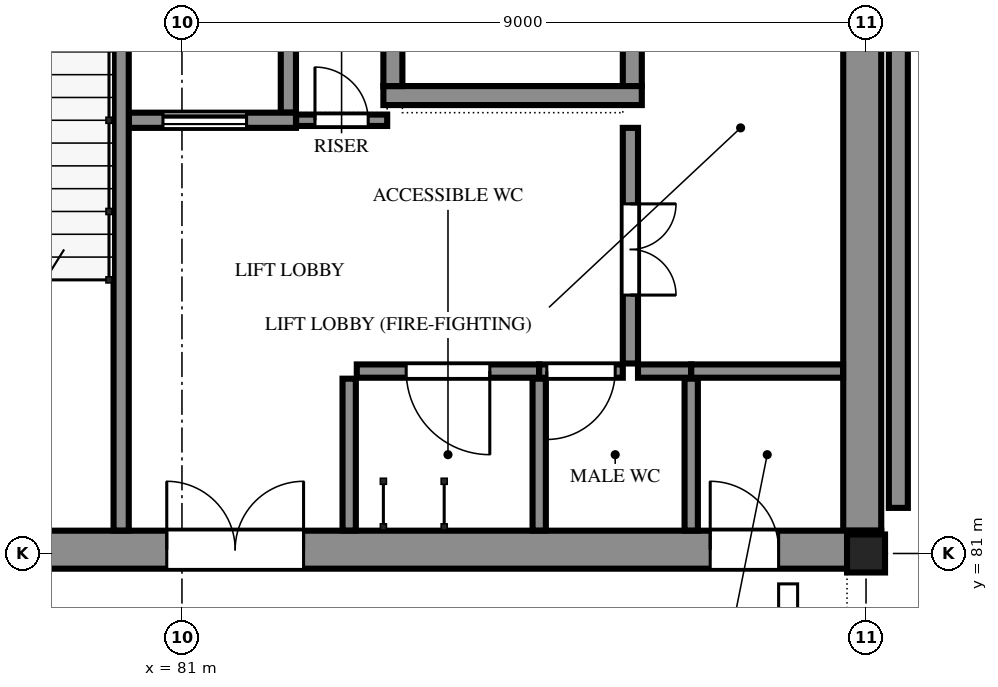
"""IFC4 building model, lengths in metres.
Left out: names, types, materials, properties, quantities, classifications, styles, units other than length and angle.
Written with IfcOpenShell. Run it as: python <this file> out.ifc"""

import sys

from ifc_helpers import new_model, si_unit, direction, frame, frame_2d, origin, origin_2d, place, context, subcontext, project, spatial, polyline, rectangle, hollow_rectangle, outline, extrude, element, fill, save


model = new_model("IFC4")
c1 = context("Model", 3, precision=1e-05, world=origin(), true_north=direction((0.0, 1.0)))
c2 = subcontext(c1, "Body", "Model", "MODEL_VIEW")
j1 = project(units=[si_unit("LENGTHUNIT", "METRE"), si_unit("PLANEANGLEUNIT", "RADIAN")], contexts=[c1])
p1 = place(None, origin())
s1 = spatial("IfcSite", under=j1, at=p1, CompositionType="ELEMENT")
p2 = place(p1, origin())
s2 = spatial("IfcBuilding", under=s1, at=p2, CompositionType="ELEMENT")
p3 = place(p2, frame((0.0, 0.0, 11.7)))
s3 = spatial("IfcBuildingStorey", under=s2, at=p3, CompositionType="ELEMENT", Elevation=11.7)
p4 = place(p3, frame((90.0, 81.0, 0.0), z_axis=(0.0, 0.0, 1.0), x_axis=(1.0, 0.0, 0.0)))
e1 = element("IfcColumn", 1, at=p4, inside=s3, PredefinedType="COLUMN", context=c2, shape_type="SweptSolid", body=[
    extrude(hollow_rectangle(XDim=0.5, YDim=0.5, WallThickness=0.032, at=origin_2d()), origin(), (0.0, 0.0, 1.0), 4.2),
])
p5 = place(p3, frame((71.8, 81.05, 0.0), z_axis=(0.0, 0.0, 1.0), x_axis=(1.0, 0.0, 0.0)))
e2 = element("IfcWall", 2, at=p5, inside=s3, PredefinedType="SOLIDWALL", context=c2, shape_type="SweptSolid", body=[
    extrude(rectangle(XDim=18.4, YDim=0.5, at=frame_2d((9.2, 0.0))), origin(), (0.0, 0.0, 1.0), 4.2),
])
p6 = place(p5, frame((1.5, 0.0, 0.0)))
e3 = element("IfcOpeningElement", 3, at=p6, cuts=e2, PredefinedType="OPENING", context=c2, shape_type="SweptSolid", body=[
    extrude(rectangle(XDim=1.8, YDim=2.1, at=frame_2d((0.9, 1.05))), frame((0.0, 0.26, 0.0), z_axis=(0.0, -1.0, 0.0), x_axis=(1.0, 0.0, 0.0)), (0.0, 0.0, 1.0), 0.52),
])
p7 = place(p5, frame((5.5, 0.0, 0.0)))
e4 = element("IfcOpeningElement", 4, at=p7, cuts=e2, PredefinedType="OPENING", context=c2, shape_type="SweptSolid", body=[
    extrude(rectangle(XDim=1.8, YDim=2.1, at=frame_2d((0.9, 1.05))), frame((0.0, 0.26, 0.0), z_axis=(0.0, -1.0, 0.0), x_axis=(1.0, 0.0, 0.0)), (0.0, 0.0, 1.0), 0.52),
])
p8 = place(p5, frame((9.0, 0.0, 0.0)))
e5 = element("IfcOpeningElement", 5, at=p8, cuts=e2, PredefinedType="OPENING", context=c2, shape_type="SweptSolid", body=[
    extrude(rectangle(XDim=1.8, YDim=2.1, at=frame_2d((0.9, 1.05))), frame((0.0, 0.26, 0.0), z_axis=(0.0, -1.0, 0.0), x_axis=(1.0, 0.0, 0.0)), (0.0, 0.0, 1.0), 0.52),
])
p9 = place(p5, frame((16.15, 0.0, 0.0)))
e6 = element("IfcOpeningElement", 6, at=p9, cuts=e2, PredefinedType="OPENING", context=c2, shape_type="SweptSolid", body=[
    extrude(rectangle(XDim=0.9, YDim=2.1, at=frame_2d((0.45, 1.05))), frame((0.0, 0.26, 0.0), z_axis=(0.0, -1.0, 0.0), x_axis=(1.0, 0.0, 0.0)), (0.0, 0.0, 1.0), 0.52),
])
p10 = place(p3, frame((89.95, 81.3, 0.0), z_axis=(0.0, 0.0, 1.0), x_axis=(0.0, 1.0, 0.0)))
e7 = element("IfcWall", 7, at=p10, inside=s3, PredefinedType="SOLIDWALL", context=c2, shape_type="SweptSolid", body=[
    extrude(rectangle(XDim=8.4, YDim=0.5, at=frame_2d((4.2, 0.0))), origin(), (0.0, 0.0, 1.0), 4.2),
])
p11 = place(p3, frame((90.425, 81.6, 0.0), z_axis=(0.0, 0.0, 1.0), x_axis=(0.0, 1.0, 0.0)))
e8 = element("IfcWall", 8, at=p11, inside=s3, PredefinedType="SOLIDWALL", context=c2, shape_type="SweptSolid", body=[
    extrude(outline(polyline([(0.0, 0.0), (8.7, 0.0), (8.7, 12.6), (0.0, 12.6), (0.0, 0.0)]), holes=[polyline([(2.056, 2.215), (2.076, 2.329), (2.108, 2.439), (2.152, 2.546), (2.208, 2.646), (2.275, 2.74), (2.352, 2.826), (2.438, 2.903), (2.532, 2.969), (2.633, 3.025), (2.739, 3.068), (2.85, 3.1), (2.961, 3.068), (3.067, 3.025), (3.168, 2.969), (3.262, 2.903), (3.348, 2.826), (3.425, 2.74), (3.492, 2.646), (3.548, 2.546), (3.592, 2.439), (3.624, 2.329), (3.644, 2.215), (3.65, 2.1), (3.65, 0.6), (2.05, 0.6), (2.05, 2.1), (2.056, 2.215)]), polyline([(5.076, 2.329), (5.108, 2.439), (5.152, 2.546), (5.208, 2.646), (5.275, 2.74), (5.352, 2.826), (5.438, 2.903), (5.532, 2.969), (5.633, 3.025), (5.739, 3.068), (5.85, 3.1), (5.961, 3.068), (6.067, 3.025), (6.168, 2.969), (6.262, 2.903), (6.348, 2.826), (6.425, 2.74), (6.492, 2.646), (6.548, 2.546), (6.592, 2.439), (6.624, 2.329), (6.644, 2.215), (6.65, 2.1), (6.65, 0.6), (5.05, 0.6), (5.05, 2.1), (5.056, 2.215), (5.076, 2.329)]), polyline([(2.076, 6.529), (2.108, 6.639), (2.152, 6.746), (2.208, 6.846), (2.275, 6.94), (2.352, 7.026), (2.438, 7.103), (2.532, 7.169), (2.633, 7.225), (2.739, 7.269), (2.85, 7.3), (2.961, 7.269), (3.067, 7.225), (3.168, 7.169), (3.262, 7.103), (3.348, 7.026), (3.425, 6.94), (3.492, 6.846), (3.548, 6.746), (3.592, 6.639), (3.624, 6.529), (3.644, 6.415), (3.65, 6.3), (3.65, 4.8), (2.05, 4.8), (2.05, 6.3), (2.056, 6.415), (2.076, 6.529)]), polyline([(5.056, 6.415), (5.076, 6.529), (5.108, 6.639), (5.152, 6.746), (5.208, 6.846), (5.275, 6.94), (5.352, 7.026), (5.438, 7.103), (5.532, 7.169), (5.633, 7.225), (5.739, 7.269), (5.85, 7.3), (5.961, 7.269), (6.067, 7.225), (6.168, 7.169), (6.262, 7.103), (6.348, 7.026), (6.425, 6.94), (6.492, 6.846), (6.548, 6.746), (6.592, 6.639), (6.624, 6.529), (6.644, 6.415), (6.65, 6.3), (6.65, 4.8), (5.05, 4.8), (5.05, 6.3), (5.056, 6.415)]), polyline([(2.076, 10.729), (2.108, 10.839), (2.152, 10.946), (2.208, 11.046), (2.275, 11.14), (2.352, 11.226), (2.438, 11.303), (2.532, 11.369), (2.633, 11.425), (2.739, 11.469), (2.85, 11.5), (2.961, 11.469), (3.067, 11.425), (3.168, 11.369), (3.262, 11.303), (3.348, 11.226), (3.425, 11.14), (3.492, 11.046), (3.548, 10.946), (3.592, 10.839), (3.624, 10.729), (3.644, 10.615), (3.65, 10.5), (3.65, 9.0), (2.05, 9.0), (2.05, 10.5), (2.056, 10.615), (2.076, 10.729)]), polyline([(5.076, 10.729), (5.108, 10.839), (5.152, 10.946), (5.208, 11.046), (5.275, 11.14), (5.352, 11.226), (5.438, 11.303), (5.532, 11.369), (5.633, 11.425), (5.739, 11.469), (5.85, 11.5), (5.961, 11.469), (6.067, 11.425), (6.168, 11.369), (6.262, 11.303), (6.348, 11.226), (6.425, 11.14), (6.492, 11.046), (6.548, 10.946), (6.592, 10.839), (6.624, 10.729), (6.644, 10.615), (6.65, 10.5), (6.65, 9.0), (5.05, 9.0), (5.05, 10.5), (5.056, 10.615), (5.076, 10.729)])]), frame((0.0, 0.125, 0.0), z_axis=(0.0, -1.0, 0.0), x_axis=(1.0, 0.0, 0.0)), (0.0, 0.0, 1.0), 0.25),
])
p12 = place(p3, frame((80.2, 81.302, -0.15), z_axis=(0.0, 0.0, 1.0), x_axis=(0.0, 1.0, 0.0)))
e9 = element("IfcWall", 9, at=p12, inside=s3, PredefinedType="SOLIDWALL", context=c2, shape_type="SweptSolid", body=[
    extrude(rectangle(XDim=8.396, YDim=0.2, at=frame_2d((4.198, 0.0))), origin(), (0.0, 0.0, 1.0), 3.666),
])
p13 = place(p3, frame((80.302, 86.7, 0.0), z_axis=(0.0, 0.0, 1.0), x_axis=(1.0, 0.0, 0.0)))
e10 = element("IfcWall", 10, at=p13, inside=s3, PredefinedType="SOLIDWALL", context=c2, shape_type="SweptSolid", body=[
    extrude(rectangle(XDim=2.198, YDim=0.2, at=frame_2d((1.099, 0.0))), origin(), (0.0, 0.0, 1.0), 3.516),
])
p14 = place(p13, frame((0.448, 0.0, 0.0)))
e11 = element("IfcOpeningElement", 11, at=p14, cuts=e10, PredefinedType="OPENING", context=c2, shape_type="SweptSolid", body=[
    extrude(rectangle(XDim=1.1, YDim=2.1, at=frame_2d((0.55, 1.05))), frame((0.0, 0.11, 0.0), z_axis=(0.0, -1.0, 0.0), x_axis=(1.0, 0.0, 0.0)), (0.0, 0.0, 1.0), 0.22),
])
p15 = place(p3, frame((82.4, 86.8, 0.0), z_axis=(0.0, 0.0, 1.0), x_axis=(0.0, 1.0, 0.0)))
e12 = element("IfcWall", 12, at=p15, inside=s3, PredefinedType="SOLIDWALL", context=c2, shape_type="SweptSolid", body=[
    extrude(rectangle(XDim=2.898, YDim=0.2, at=frame_2d((1.449, 0.0))), origin(), (0.0, 0.0, 1.0), 3.516),
])
p16 = place(p3, frame((83.65, 87.025, 0.0), z_axis=(0.0, 0.0, 1.0), x_axis=(1.0, 0.0, 0.0)))
e13 = element("IfcWall", 13, at=p16, inside=s3, PredefinedType="SOLIDWALL", context=c2, shape_type="SweptSolid", body=[
    extrude(rectangle(XDim=3.4, YDim=0.25, at=frame_2d((1.7, 0.0))), origin(), (0.0, 0.0, 1.0), 3.516),
])
p17 = place(p3, frame((83.775, 87.15, 0.0), z_axis=(0.0, 0.0, 1.0), x_axis=(0.0, 1.0, 0.0)))
e14 = element("IfcWall", 14, at=p17, inside=s3, PredefinedType="SOLIDWALL", context=c2, shape_type="SweptSolid", body=[
    extrude(rectangle(XDim=2.2, YDim=0.25, at=frame_2d((1.1, 0.0))), origin(), (0.0, 0.0, 1.0), 3.516),
])
p18 = place(p3, frame((86.925, 87.15, 0.0), z_axis=(0.0, 0.0, 1.0), x_axis=(0.0, 1.0, 0.0)))
e15 = element("IfcWall", 15, at=p18, inside=s3, PredefinedType="SOLIDWALL", context=c2, shape_type="SweptSolid", body=[
    extrude(rectangle(XDim=2.2, YDim=0.25, at=frame_2d((1.1, 0.0))), origin(), (0.0, 0.0, 1.0), 3.516),
])
p19 = place(p18, frame((0.5, 0.0, 0.0)))
e16 = element("IfcOpeningElement", 16, at=p19, cuts=e15, PredefinedType="OPENING", context=c2, shape_type="SweptSolid", body=[
    extrude(rectangle(XDim=1.2, YDim=2.1, at=frame_2d((0.6, 1.05))), frame((0.0, 0.135, 0.0), z_axis=(0.0, -1.0, 0.0), x_axis=(1.0, 0.0, 0.0)), (0.0, 0.0, 1.0), 0.27),
])
p20 = place(p3, frame((85.7, 83.4, 0.0), z_axis=(0.0, 0.0, 1.0), x_axis=(-1.0, 0.0, 0.0)))
e17 = element("IfcWall", 17, at=p20, inside=s3, PredefinedType="PARTITIONING", context=c2, shape_type="SweptSolid", body=[
    extrude(rectangle(XDim=2.4, YDim=0.175, at=frame_2d((1.2, 0.0))), origin(), (0.0, 0.0, 1.0), 3.307),
])
p21 = place(p20, frame((0.65, 0.0, 0.0)))
e18 = element("IfcOpeningElement", 18, at=p21, cuts=e17, PredefinedType="OPENING", context=c2, shape_type="SweptSolid", body=[
    extrude(rectangle(XDim=1.1, YDim=2.1, at=frame_2d((0.55, 1.05))), frame((0.0, 0.097, 0.0), z_axis=(0.0, -1.0, 0.0), x_axis=(1.0, 0.0, 0.0)), (0.0, 0.0, 1.0), 0.195),
])
p22 = place(p3, frame((83.2, 83.3, 0.0), z_axis=(0.0, 0.0, 1.0), x_axis=(0.0, -1.0, 0.0)))
e19 = element("IfcWall", 19, at=p22, inside=s3, PredefinedType="PARTITIONING", context=c2, shape_type="SweptSolid", body=[
    extrude(rectangle(XDim=1.998, YDim=0.175, at=frame_2d((0.999, 0.0))), origin(), (0.0, 0.0, 1.0), 3.307),
])
p23 = place(p3, frame((86.8, 83.4, 0.0), z_axis=(0.0, 0.0, 1.0), x_axis=(-1.0, 0.0, 0.0)))
e20 = element("IfcWall", 20, at=p23, inside=s3, PredefinedType="PARTITIONING", context=c2, shape_type="SweptSolid", body=[
    extrude(rectangle(XDim=1.1, YDim=0.175, at=frame_2d((0.55, 0.0))), origin(), (0.0, 0.0, 1.0), 3.307),
])
p24 = place(p23, frame((0.1, 0.0, 0.0)))
e21 = element("IfcOpeningElement", 21, at=p24, cuts=e20, PredefinedType="OPENING", context=c2, shape_type="SweptSolid", body=[
    extrude(rectangle(XDim=0.9, YDim=2.1, at=frame_2d((0.45, 1.05))), frame((0.0, 0.097, 0.0), z_axis=(0.0, -1.0, 0.0), x_axis=(1.0, 0.0, 0.0)), (0.0, 0.0, 1.0), 0.195),
])
p25 = place(p3, frame((86.9, 86.6, 0.0), z_axis=(0.0, 0.0, 1.0), x_axis=(0.0, -1.0, 0.0)))
e22 = element("IfcWall", 22, at=p25, inside=s3, PredefinedType="PARTITIONING", context=c2, shape_type="SweptSolid", body=[
    extrude(rectangle(XDim=3.1, YDim=0.2, at=frame_2d((1.55, 0.0))), origin(), (0.0, 0.0, 1.0), 3.382),
])
p26 = place(p25, frame((1.0, 0.0, 0.0)))
e23 = element("IfcOpeningElement", 23, at=p26, cuts=e22, PredefinedType="OPENING", context=c2, shape_type="SweptSolid", body=[
    extrude(rectangle(XDim=1.2, YDim=2.1, at=frame_2d((0.6, 1.05))), frame((0.0, 0.11, 0.0), z_axis=(0.0, -1.0, 0.0), x_axis=(1.0, 0.0, 0.0)), (0.0, 0.0, 1.0), 0.22),
])
p27 = place(p3, frame((82.502, 86.7, 0.0), z_axis=(0.0, 0.0, 1.0), x_axis=(1.0, 0.0, 0.0)))
e24 = element("IfcWall", 24, at=p27, inside=s3, PredefinedType="SOLIDWALL", context=c2, shape_type="SweptSolid", body=[
    extrude(rectangle(XDim=1.198, YDim=0.15, at=frame_2d((0.599, 0.0))), origin(), (0.0, 0.0, 1.0), 3.516),
])
p28 = place(p27, frame((0.248, 0.0, 0.0)))
e25 = element("IfcOpeningElement", 25, at=p28, cuts=e24, PredefinedType="OPENING", context=c2, shape_type="SweptSolid", body=[
    extrude(rectangle(XDim=0.7, YDim=2.0, at=frame_2d((0.35, 1.0))), frame((0.0, 0.085, 0.0), z_axis=(0.0, -1.0, 0.0), x_axis=(1.0, 0.0, 0.0)), (0.0, 0.0, 1.0), 0.17),
])
p29 = place(p3, frame((87.7, 83.4, 0.0), z_axis=(0.0, 0.0, 1.0), x_axis=(-1.0, 0.0, 0.0)))
e26 = element("IfcWall", 26, at=p29, inside=s3, PredefinedType="PARTITIONING", context=c2, shape_type="SweptSolid", body=[
    extrude(rectangle(XDim=0.7, YDim=0.175, at=frame_2d((0.35, 0.0))), origin(), (0.0, 0.0, 1.0), 3.307),
])
for number, where, z_axis, x_axis in (
    (27, (89.698, 83.4, 0.0), (0.0, 0.0, 1.0), (-1.0, 0.0, 0.0)),
    (28, (85.7, 83.3, 0.0), (0.0, 0.0, 1.0), (0.0, -1.0, 0.0)),
    (29, (87.7, 83.3, 0.0), (0.0, 0.0, 1.0), (0.0, -1.0, 0.0)),
):
    element("IfcWall", number, at=place(p3, frame(where, z_axis=z_axis, x_axis=x_axis)), inside=s3, PredefinedType="PARTITIONING", context=c2, shape_type="SweptSolid", body=[
        extrude(rectangle(XDim=1.998, YDim=0.175, at=frame_2d((0.999, 0.0))), origin(), (0.0, 0.0, 1.0), 3.307),
    ])
p30 = place(p14, origin())
e30 = element("IfcDoor", 30, at=p30, inside=s3, OperationType="SLIDING_TO_LEFT", PredefinedType="DOOR", context=c2, shape_type="SweptSolid", body=[
    extrude(outline(polyline([(0.0, 0.0), (0.07, 0.0), (0.07, 2.03), (1.03, 2.03), (1.03, 0.0), (1.1, 0.0), (1.1, 2.1), (0.0, 2.1), (0.0, 0.0)])), frame((0.0, 0.025, 0.0), z_axis=(0.0, -1.0, 0.0), x_axis=(1.0, 0.0, 0.0)), (0.0, 0.0, 1.0), 0.05),
    extrude(rectangle(XDim=0.524, YDim=2.016, at=frame_2d((0.336, 1.018))), frame((0.0, 0.018, 0.0), z_axis=(0.0, -1.0, 0.0), x_axis=(1.0, 0.0, 0.0)), (0.0, 0.0, 1.0), 0.016),
    extrude(rectangle(XDim=0.52, YDim=2.016, at=frame_2d((0.766, 1.018))), frame((0.0, -0.002, 0.0), z_axis=(0.0, -1.0, 0.0), x_axis=(1.0, 0.0, 0.0)), (0.0, 0.0, 1.0), 0.016),
])
fill(e11, e30)
p31 = place(p8, origin())
e31 = element("IfcDoor", 31, at=p31, inside=s3, OperationType="DOUBLE_DOOR_SINGLE_SWING", PredefinedType="DOOR", context=c2, shape_type="SweptSolid", body=[
    extrude(outline(polyline([(0.0, 0.0), (0.07, 0.0), (0.07, 2.03), (1.73, 2.03), (1.73, 0.0), (1.8, 0.0), (1.8, 2.1), (0.0, 2.1), (0.0, 0.0)])), frame((0.0, 0.025, 0.0), z_axis=(0.0, -1.0, 0.0), x_axis=(1.0, 0.0, 0.0)), (0.0, 0.0, 1.0), 0.05),
    extrude(outline(polyline([(0.074, 0.01), (0.897, 0.01), (0.897, 2.026), (0.074, 2.026), (0.074, 0.01)]), holes=[polyline([(0.194, 0.16), (0.777, 0.16), (0.777, 1.01), (0.194, 1.01), (0.194, 0.16)]), polyline([(0.335, 1.16), (0.635, 1.16), (0.635, 1.76), (0.335, 1.76), (0.335, 1.16)])]), frame((0.0, 0.017, 0.0), z_axis=(0.0, -1.0, 0.0), x_axis=(1.0, 0.0, 0.0)), (0.0, 0.0, 1.0), 0.035),
    extrude(rectangle(XDim=0.583, YDim=0.85, at=frame_2d((0.485, 0.585))), frame((0.0, 0.009, 0.0), z_axis=(0.0, -1.0, 0.0), x_axis=(1.0, 0.0, 0.0)), (0.0, 0.0, 1.0), 0.017),
    extrude(rectangle(XDim=0.3, YDim=0.6, at=frame_2d((0.485, 1.46))), frame((0.0, 0.006, 0.0), z_axis=(0.0, -1.0, 0.0), x_axis=(1.0, 0.0, 0.0)), (0.0, 0.0, 1.0), 0.012),
    extrude(outline(polyline([(0.903, 0.01), (1.726, 0.01), (1.726, 2.026), (0.903, 2.026), (0.903, 0.01)]), holes=[polyline([(1.023, 0.16), (1.606, 0.16), (1.606, 1.01), (1.023, 1.01), (1.023, 0.16)]), polyline([(1.165, 1.16), (1.465, 1.16), (1.465, 1.76), (1.165, 1.76), (1.165, 1.16)])]), frame((0.0, 0.017, 0.0), z_axis=(0.0, -1.0, 0.0), x_axis=(1.0, 0.0, 0.0)), (0.0, 0.0, 1.0), 0.035),
    extrude(rectangle(XDim=0.583, YDim=0.85, at=frame_2d((1.314, 0.585))), frame((0.0, 0.009, 0.0), z_axis=(0.0, -1.0, 0.0), x_axis=(1.0, 0.0, 0.0)), (0.0, 0.0, 1.0), 0.017),
    extrude(rectangle(XDim=0.3, YDim=0.6, at=frame_2d((1.314, 1.46))), frame((0.0, 0.006, 0.0), z_axis=(0.0, -1.0, 0.0), x_axis=(1.0, 0.0, 0.0)), (0.0, 0.0, 1.0), 0.012),
])
fill(e5, e31)
p32 = place(p26, origin())
e32 = element("IfcDoor", 32, at=p32, inside=s3, OperationType="DOUBLE_DOOR_SINGLE_SWING", PredefinedType="DOOR", context=c2, shape_type="SweptSolid", body=[
    extrude(outline(polyline([(0.0, 0.0), (0.07, 0.0), (0.07, 2.03), (1.13, 2.03), (1.13, 0.0), (1.2, 0.0), (1.2, 2.1), (0.0, 2.1), (0.0, 0.0)])), frame((0.0, 0.025, 0.0), z_axis=(0.0, -1.0, 0.0), x_axis=(1.0, 0.0, 0.0)), (0.0, 0.0, 1.0), 0.05),
    extrude(outline(polyline([(0.074, 0.01), (0.597, 0.01), (0.597, 2.026), (0.074, 2.026), (0.074, 0.01)]), holes=[polyline([(0.178, 0.373), (0.492, 0.373), (0.492, 1.784), (0.178, 1.784), (0.178, 0.373)])]), frame((0.0, 0.017, 0.0), z_axis=(0.0, -1.0, 0.0), x_axis=(1.0, 0.0, 0.0)), (0.0, 0.0, 1.0), 0.035),
    extrude(rectangle(XDim=0.314, YDim=1.411, at=frame_2d((0.335, 1.079))), frame((0.0, 0.009, 0.0), z_axis=(0.0, -1.0, 0.0), x_axis=(1.0, 0.0, 0.0)), (0.0, 0.0, 1.0), 0.017),
    extrude(outline(polyline([(0.603, 0.01), (1.126, 0.01), (1.126, 2.026), (0.603, 2.026), (0.603, 0.01)]), holes=[polyline([(0.708, 0.373), (1.021, 0.373), (1.021, 1.784), (0.708, 1.784), (0.708, 0.373)])]), frame((0.0, 0.017, 0.0), z_axis=(0.0, -1.0, 0.0), x_axis=(1.0, 0.0, 0.0)), (0.0, 0.0, 1.0), 0.035),
    extrude(rectangle(XDim=0.314, YDim=1.411, at=frame_2d((0.865, 1.079))), frame((0.0, 0.009, 0.0), z_axis=(0.0, -1.0, 0.0), x_axis=(1.0, 0.0, 0.0)), (0.0, 0.0, 1.0), 0.017),
])
fill(e23, e32)
p33 = place(p28, origin())
e33 = element("IfcDoor", 33, at=p33, inside=s3, OperationType="SINGLE_SWING_LEFT", PredefinedType="DOOR", context=c2, shape_type="SweptSolid", body=[
    extrude(outline(polyline([(0.0, 0.0), (0.07, 0.0), (0.07, 1.93), (0.63, 1.93), (0.63, 0.0), (0.7, 0.0), (0.7, 2.0), (0.0, 2.0), (0.0, 0.0)])), frame((0.0, 0.025, 0.0), z_axis=(0.0, -1.0, 0.0), x_axis=(1.0, 0.0, 0.0)), (0.0, 0.0, 1.0), 0.05),
    extrude(outline(polyline([(0.074, 0.01), (0.626, 0.01), (0.626, 1.926), (0.074, 1.926), (0.074, 0.01)]), holes=[polyline([(0.184, 0.16), (0.516, 0.16), (0.516, 1.01), (0.184, 1.01), (0.184, 0.16)]), polyline([(0.2, 1.16), (0.5, 1.16), (0.5, 1.76), (0.2, 1.76), (0.2, 1.16)])]), frame((0.0, 0.017, 0.0), z_axis=(0.0, -1.0, 0.0), x_axis=(1.0, 0.0, 0.0)), (0.0, 0.0, 1.0), 0.035),
    extrude(rectangle(XDim=0.331, YDim=0.85, at=frame_2d((0.35, 0.585))), frame((0.0, 0.009, 0.0), z_axis=(0.0, -1.0, 0.0), x_axis=(1.0, 0.0, 0.0)), (0.0, 0.0, 1.0), 0.017),
    extrude(rectangle(XDim=0.3, YDim=0.6, at=frame_2d((0.35, 1.46))), frame((0.0, 0.006, 0.0), z_axis=(0.0, -1.0, 0.0), x_axis=(1.0, 0.0, 0.0)), (0.0, 0.0, 1.0), 0.012),
])
fill(e25, e33)
p34 = place(p21, origin())
e34 = element("IfcDoor", 34, at=p34, inside=s3, OperationType="SINGLE_SWING_LEFT", PredefinedType="DOOR", context=c2, shape_type="SweptSolid", body=[
    extrude(outline(polyline([(0.0, 0.0), (0.07, 0.0), (0.07, 2.03), (1.03, 2.03), (1.03, 0.0), (1.1, 0.0), (1.1, 2.1), (0.0, 2.1), (0.0, 0.0)])), frame((0.0, 0.025, 0.0), z_axis=(0.0, -1.0, 0.0), x_axis=(1.0, 0.0, 0.0)), (0.0, 0.0, 1.0), 0.05),
    extrude(outline(polyline([(0.074, 0.01), (1.026, 0.01), (1.026, 2.026), (0.074, 2.026), (0.074, 0.01)]), holes=[polyline([(0.194, 0.16), (0.906, 0.16), (0.906, 1.01), (0.194, 1.01), (0.194, 0.16)]), polyline([(0.4, 1.16), (0.7, 1.16), (0.7, 1.76), (0.4, 1.76), (0.4, 1.16)])]), frame((0.0, 0.017, 0.0), z_axis=(0.0, -1.0, 0.0), x_axis=(1.0, 0.0, 0.0)), (0.0, 0.0, 1.0), 0.035),
    extrude(rectangle(XDim=0.712, YDim=0.85, at=frame_2d((0.55, 0.585))), frame((0.0, 0.009, 0.0), z_axis=(0.0, -1.0, 0.0), x_axis=(1.0, 0.0, 0.0)), (0.0, 0.0, 1.0), 0.017),
    extrude(rectangle(XDim=0.3, YDim=0.6, at=frame_2d((0.55, 1.46))), frame((0.0, 0.006, 0.0), z_axis=(0.0, -1.0, 0.0), x_axis=(1.0, 0.0, 0.0)), (0.0, 0.0, 1.0), 0.012),
])
fill(e18, e34)
p35 = place(p24, origin())
e35 = element("IfcDoor", 35, at=p35, inside=s3, OperationType="SINGLE_SWING_RIGHT", PredefinedType="DOOR", context=c2, shape_type="SweptSolid", body=[
    extrude(outline(polyline([(0.0, 0.0), (0.07, 0.0), (0.07, 2.03), (0.83, 2.03), (0.83, 0.0), (0.9, 0.0), (0.9, 2.1), (0.0, 2.1), (0.0, 0.0)])), frame((0.0, 0.025, 0.0), z_axis=(0.0, -1.0, 0.0), x_axis=(1.0, 0.0, 0.0)), (0.0, 0.0, 1.0), 0.05),
    extrude(outline(polyline([(0.074, 0.01), (0.826, 0.01), (0.826, 2.026), (0.074, 2.026), (0.074, 0.01)]), holes=[polyline([(0.194, 0.16), (0.706, 0.16), (0.706, 1.01), (0.194, 1.01), (0.194, 0.16)]), polyline([(0.3, 1.16), (0.6, 1.16), (0.6, 1.76), (0.3, 1.76), (0.3, 1.16)])]), frame((0.0, 0.017, 0.0), z_axis=(0.0, -1.0, 0.0), x_axis=(1.0, 0.0, 0.0)), (0.0, 0.0, 1.0), 0.035),
    extrude(rectangle(XDim=0.512, YDim=0.85, at=frame_2d((0.45, 0.585))), frame((0.0, 0.009, 0.0), z_axis=(0.0, -1.0, 0.0), x_axis=(1.0, 0.0, 0.0)), (0.0, 0.0, 1.0), 0.017),
    extrude(rectangle(XDim=0.3, YDim=0.6, at=frame_2d((0.45, 1.46))), frame((0.0, 0.006, 0.0), z_axis=(0.0, -1.0, 0.0), x_axis=(1.0, 0.0, 0.0)), (0.0, 0.0, 1.0), 0.012),
])
fill(e21, e35)
p36 = place(p9, origin())
e36 = element("IfcDoor", 36, at=p36, inside=s3, OperationType="SINGLE_SWING_LEFT", PredefinedType="DOOR", context=c2, shape_type="SweptSolid", body=[
    extrude(outline(polyline([(0.0, 0.0), (0.07, 0.0), (0.07, 2.03), (0.83, 2.03), (0.83, 0.0), (0.9, 0.0), (0.9, 2.1), (0.0, 2.1), (0.0, 0.0)])), frame((0.0, 0.025, 0.0), z_axis=(0.0, -1.0, 0.0), x_axis=(1.0, 0.0, 0.0)), (0.0, 0.0, 1.0), 0.05),
    extrude(outline(polyline([(0.074, 0.01), (0.826, 0.01), (0.826, 2.026), (0.074, 2.026), (0.074, 0.01)]), holes=[polyline([(0.194, 0.16), (0.706, 0.16), (0.706, 1.01), (0.194, 1.01), (0.194, 0.16)]), polyline([(0.3, 1.16), (0.6, 1.16), (0.6, 1.76), (0.3, 1.76), (0.3, 1.16)])]), frame((0.0, 0.017, 0.0), z_axis=(0.0, -1.0, 0.0), x_axis=(1.0, 0.0, 0.0)), (0.0, 0.0, 1.0), 0.035),
    extrude(rectangle(XDim=0.512, YDim=0.85, at=frame_2d((0.45, 0.585))), frame((0.0, 0.009, 0.0), z_axis=(0.0, -1.0, 0.0), x_axis=(1.0, 0.0, 0.0)), (0.0, 0.0, 1.0), 0.017),
    extrude(rectangle(XDim=0.3, YDim=0.6, at=frame_2d((0.45, 1.46))), frame((0.0, 0.006, 0.0), z_axis=(0.0, -1.0, 0.0), x_axis=(1.0, 0.0, 0.0)), (0.0, 0.0, 1.0), 0.012),
])
fill(e6, e36)
save(model, sys.argv[1])
